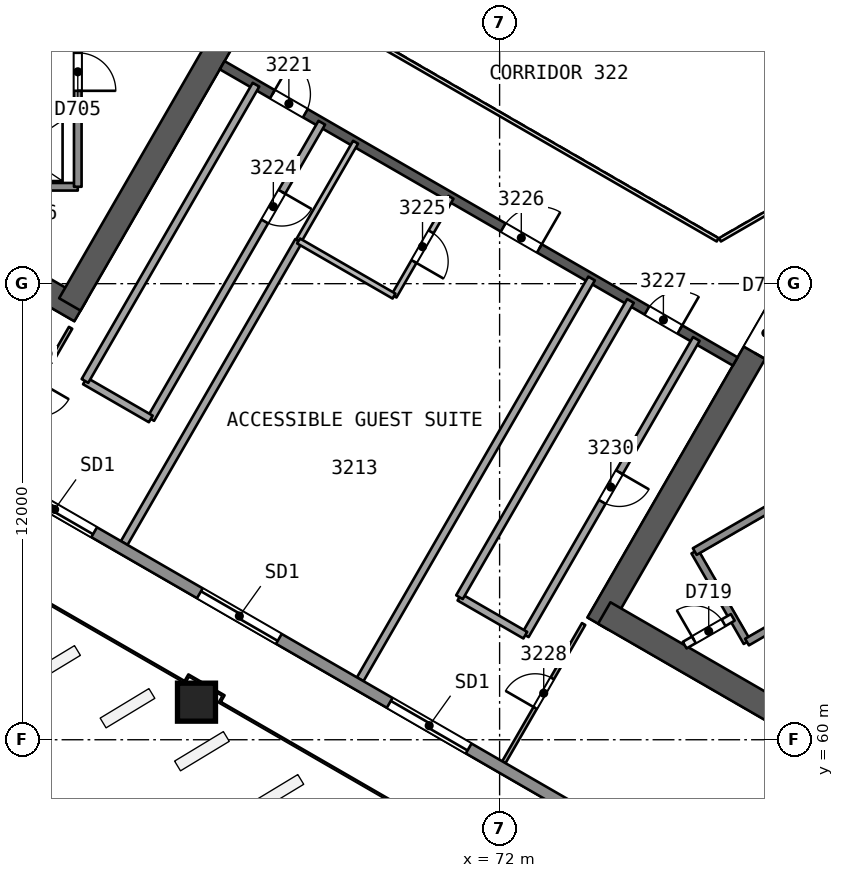
"""IFC4 building model, lengths in metres.
Left out: names, types, materials, properties, quantities, classifications, styles, units other than length and angle.
Written with IfcOpenShell. Run it as: python <this file> out.ifc"""

import sys

from ifc_helpers import new_model, si_unit, direction, frame, frame_2d, origin, origin_2d, place, context, subcontext, project, spatial, rectangle, extrude, element, fill, save


model = new_model("IFC4")
c1 = context("Model", 3, precision=1e-05, world=origin(), true_north=direction((0.0, 1.0)))
c2 = subcontext(c1, "Body", "Model", "MODEL_VIEW")
j1 = project(units=[si_unit("LENGTHUNIT", "METRE"), si_unit("PLANEANGLEUNIT", "RADIAN")], contexts=[c1])
p1 = place(None, origin())
s1 = spatial("IfcSite", under=j1, at=p1, CompositionType="ELEMENT")
p2 = place(p1, origin())
s2 = spatial("IfcBuilding", under=s1, at=p2, CompositionType="ELEMENT")
p3 = place(p2, frame((0.0, 0.0, 132.7)))
s3 = spatial("IfcBuildingStorey", under=s2, at=p3, CompositionType="ELEMENT", Elevation=132.7)
p4 = place(p3, frame((48.722, 78.365, 0.0), z_axis=(0.0, 0.0, 1.0), x_axis=(0.866020036431, -0.500009296414, 0.0)))
e1 = element("IfcWall", 1, at=p4, inside=s3, PredefinedType="SHEAR", context=c2, shape_type="SweptSolid", body=[
    extrude(rectangle(XDim=14.146, YDim=0.65, at=frame_2d((7.073, 0.0))), origin(), (0.0, 0.0, 1.0), 3.7),
])
p5 = place(p3, frame((60.691, 71.455, 0.0), z_axis=(0.0, 0.0, 1.0), x_axis=(0.499983075189, 0.866035175108, 0.0)))
e2 = element("IfcWall", 2, at=p5, inside=s3, PredefinedType="SHEAR", context=c2, shape_type="SweptSolid", body=[
    extrude(rectangle(XDim=10.055, YDim=0.65, at=frame_2d((5.027, 0.0))), origin(), (0.0, 0.0, 1.0), 3.7),
])
p6 = place(p5, frame((7.905, 0.0, 0.0)))
e3 = element("IfcOpeningElement", 3, at=p6, cuts=e2, PredefinedType="OPENING", context=c2, shape_type="SweptSolid", body=[
    extrude(rectangle(XDim=1.2, YDim=2.1, at=frame_2d((0.6, 1.05))), frame((0.0, 0.335, 0.0), z_axis=(0.0, -1.0, 0.0), x_axis=(1.0, 0.0, 0.0)), (0.0, 0.0, 1.0), 0.671),
])
p7 = place(p3, frame((79.688, 71.881, 0.0), z_axis=(0.0, 0.0, 1.0), x_axis=(-0.49999822179, -0.866026430432, 0.0)))
e4 = element("IfcWall", 4, at=p7, inside=s3, PredefinedType="SHEAR", context=c2, shape_type="SweptSolid", body=[
    extrude(rectangle(XDim=10.192, YDim=0.65, at=frame_2d((5.096, 0.0))), origin(), (0.0, 0.0, 1.0), 3.7),
])
p8 = place(p7, frame((0.762, 0.0, 0.0)))
e5 = element("IfcOpeningElement", 5, at=p8, cuts=e4, PredefinedType="OPENING", context=c2, shape_type="SweptSolid", body=[
    extrude(rectangle(XDim=1.2, YDim=2.1, at=frame_2d((0.6, 1.05))), frame((0.0, 0.335, 0.0), z_axis=(0.0, -1.0, 0.0), x_axis=(1.0, 0.0, 0.0)), (0.0, 0.0, 1.0), 0.671),
])
p9 = place(p3, frame((74.754, 63.335, 0.0), z_axis=(0.0, 0.0, 1.0), x_axis=(0.866026250715, -0.49999853307, 0.0)))
e6 = element("IfcWall", 6, at=p9, inside=s3, PredefinedType="SHEAR", context=c2, shape_type="SweptSolid", body=[
    extrude(rectangle(XDim=14.008, YDim=0.65, at=frame_2d((7.004, 0.0))), origin(), (0.0, 0.0, 1.0), 3.7),
])
p10 = place(p3, frame((64.7, 77.748, 0.0), z_axis=(0.0, 0.0, 1.0), x_axis=(0.866026492143, -0.499998114903, 0.0)))
e7 = element("IfcWall", 7, at=p10, inside=s3, PredefinedType="SHEAR", context=c2, shape_type="SweptSolid", body=[
    extrude(rectangle(XDim=15.588, YDim=0.25, at=frame_2d((7.794, 0.0))), origin(), (0.0, 0.0, 1.0), 3.25),
])
p11 = place(p10, frame((1.527, 0.0, 0.0)))
e8 = element("IfcOpeningElement", 8, at=p11, cuts=e7, PredefinedType="OPENING", context=c2, shape_type="SweptSolid", body=[
    extrude(rectangle(XDim=1.0, YDim=2.1, at=frame_2d((0.5, 1.05))), frame((0.0, 0.135, 0.0), z_axis=(0.0, -1.0, 0.0), x_axis=(1.0, 0.0, 0.0)), (0.0, 0.0, 1.0), 0.271),
])
p12 = place(p10, frame((8.538, 0.0, 0.0)))
e9 = element("IfcOpeningElement", 9, at=p12, cuts=e7, PredefinedType="OPENING", context=c2, shape_type="SweptSolid", body=[
    extrude(rectangle(XDim=1.1, YDim=2.1, at=frame_2d((0.55, 1.05))), frame((0.0, 0.135, 0.0), z_axis=(0.0, -1.0, 0.0), x_axis=(1.0, 0.0, 0.0)), (0.0, 0.0, 1.0), 0.271),
])
p13 = place(p10, frame((12.906, 0.0, 0.0)))
e10 = element("IfcOpeningElement", 10, at=p13, cuts=e7, PredefinedType="OPENING", context=c2, shape_type="SweptSolid", body=[
    extrude(rectangle(XDim=1.0, YDim=2.1, at=frame_2d((0.5, 1.05))), frame((0.0, 0.135, 0.0), z_axis=(0.0, -1.0, 0.0), x_axis=(1.0, 0.0, 0.0)), (0.0, 0.0, 1.0), 0.271),
])
p14 = place(p3, frame((64.012, 60.968, 0.0), z_axis=(0.010093620709, 0.017482414954, 0.999796221231), x_axis=(-0.499907122366, -0.865843723195, 0.020187025824)))
e11 = element("IfcColumn", 11, at=p14, inside=s3, PredefinedType="COLUMN", context=c2, shape_type="SweptSolid", body=[
    extrude(rectangle(XDim=1.0, YDim=1.0, at=origin_2d()), origin(), (0.0, 0.0, 1.0), 3.701),
])
p15 = place(p3, frame((60.71, 70.838, 0.0), z_axis=(0.0, 0.0, 1.0), x_axis=(-0.49999760543, -0.866026786286, 0.0)))
e12 = element("IfcWall", 12, at=p15, inside=s3, PredefinedType="PARTITIONING", context=c2, shape_type="SweptSolid", body=[
    extrude(rectangle(XDim=4.199, YDim=0.1, at=frame_2d((2.099, 0.0))), origin(), (0.0, 0.0, 1.0), 3.25),
])
p16 = place(p15, frame((1.649, 0.0, 0.0)))
e13 = element("IfcOpeningElement", 13, at=p16, cuts=e12, PredefinedType="OPENING", context=c2, shape_type="SweptSolid", body=[
    extrude(rectangle(XDim=0.9, YDim=2.1, at=frame_2d((0.45, 1.05))), frame((0.0, 0.061, 0.0), z_axis=(0.0, -1.0, 0.0), x_axis=(1.0, 0.0, 0.0)), (0.0, 0.0, 1.0), 0.121),
])
p17 = place(p3, frame((67.321, 76.235, 0.0), z_axis=(0.0, 0.0, 1.0), x_axis=(-0.5000018851, -0.866024315419, 0.0)))
e14 = element("IfcWall", 14, at=p17, inside=s3, PredefinedType="PARTITIONING", context=c2, shape_type="SweptSolid", body=[
    extrude(rectangle(XDim=9.0, YDim=0.2, at=frame_2d((4.5, 0.0))), origin(), (0.0, 0.0, 1.0), 3.25),
])
p18 = place(p17, frame((2.1, 0.0, 0.0)))
e15 = element("IfcOpeningElement", 15, at=p18, cuts=e14, PredefinedType="OPENING", context=c2, shape_type="SweptSolid", body=[
    extrude(rectangle(XDim=0.9, YDim=2.1, at=frame_2d((0.45, 1.05))), frame((0.0, 0.11, 0.0), z_axis=(0.0, -1.0, 0.0), x_axis=(1.0, 0.0, 0.0)), (0.0, 0.0, 1.0), 0.221),
])
p19 = place(p3, frame((62.821, 68.441, 0.0), z_axis=(0.0, 0.0, 1.0), x_axis=(-0.866041268327, 0.499972520799, 0.0)))
e16 = element("IfcWall", 16, at=p19, inside=s3, PredefinedType="PARTITIONING", context=c2, shape_type="SweptSolid", body=[
    extrude(rectangle(XDim=2.0, YDim=0.2, at=frame_2d((1.0, 0.0))), origin(), (0.0, 0.0, 1.0), 3.25),
])
p20 = place(p3, frame((61.089, 69.441, 0.0), z_axis=(0.0, 0.0, 1.0), x_axis=(0.5000018851, 0.866024315419, 0.0)))
e17 = element("IfcWall", 17, at=p20, inside=s3, PredefinedType="PARTITIONING", context=c2, shape_type="SweptSolid", body=[
    extrude(rectangle(XDim=9.0, YDim=0.2, at=frame_2d((4.5, 0.0))), origin(), (0.0, 0.0, 1.0), 3.25),
])
p21 = place(p3, frame((62.121, 65.176, 0.0), z_axis=(0.0, 0.0, 1.0), x_axis=(0.5000072221, 0.866021234063, 0.0)))
e18 = element("IfcWall", 18, at=p21, inside=s3, PredefinedType="PARTITIONING", context=c2, shape_type="SweptSolid", body=[
    extrude(rectangle(XDim=9.177, YDim=0.2, at=frame_2d((4.589, 0.0))), origin(), (0.0, 0.0, 1.0), 3.25),
])
p22 = place(p3, frame((66.71, 73.124, 0.0), z_axis=(0.0, 0.0, 1.0), x_axis=(0.499990139034, 0.866031096941, 0.0)))
e19 = element("IfcWall", 19, at=p22, inside=s3, PredefinedType="PARTITIONING", context=c2, shape_type="SweptSolid", body=[
    extrude(rectangle(XDim=3.0, YDim=0.15, at=frame_2d((1.5, 0.0))), origin(), (0.0, 0.0, 1.0), 3.25),
])
p23 = place(p3, frame((70.721, 74.272, 0.0), z_axis=(0.0, 0.0, 1.0), x_axis=(-0.50002537861, -0.866010750942, 0.0)))
e20 = element("IfcWall", 20, at=p23, inside=s3, PredefinedType="PARTITIONING", context=c2, shape_type="SweptSolid", body=[
    extrude(rectangle(XDim=3.0, YDim=0.15, at=frame_2d((1.5, 0.0))), origin(), (0.0, 0.0, 1.0), 3.25),
])
p24 = place(p23, frame((1.05, 0.0, 0.0)))
e21 = element("IfcOpeningElement", 21, at=p24, cuts=e20, PredefinedType="OPENING", context=c2, shape_type="SweptSolid", body=[
    extrude(rectangle(XDim=0.9, YDim=2.1, at=frame_2d((0.45, 1.05))), frame((0.0, 0.085, 0.0), z_axis=(0.0, -1.0, 0.0), x_axis=(1.0, 0.0, 0.0)), (0.0, 0.0, 1.0), 0.171),
])
p25 = place(p3, frame((69.221, 71.674, 0.0), z_axis=(0.0, 0.0, 1.0), x_axis=(-0.866032775405, 0.499987231761, 0.0)))
e22 = element("IfcWall", 22, at=p25, inside=s3, PredefinedType="PARTITIONING", context=c2, shape_type="SweptSolid", body=[
    extrude(rectangle(XDim=2.9, YDim=0.15, at=frame_2d((1.45, 0.0))), origin(), (0.0, 0.0, 1.0), 3.25),
])
p26 = place(p3, frame((68.331, 61.59, 0.0), z_axis=(0.0, 0.0, 1.0), x_axis=(0.499987977232, 0.866032345022, 0.0)))
e23 = element("IfcWall", 23, at=p26, inside=s3, PredefinedType="PARTITIONING", context=c2, shape_type="SweptSolid", body=[
    extrude(rectangle(XDim=12.177, YDim=0.2, at=frame_2d((6.089, 0.0))), origin(), (0.0, 0.0, 1.0), 3.25),
])
p27 = place(p3, frame((72.111, 59.408, 0.0), z_axis=(0.0, 0.0, 1.0), x_axis=(0.49999760543, 0.866026786286, 0.0)))
e24 = element("IfcWall", 24, at=p27, inside=s3, PredefinedType="PARTITIONING", context=c2, shape_type="SweptSolid", body=[
    extrude(rectangle(XDim=4.199, YDim=0.1, at=frame_2d((2.099, 0.0))), origin(), (0.0, 0.0, 1.0), 3.25),
])
p28 = place(p27, frame((1.649, 0.0, 0.0)))
e25 = element("IfcOpeningElement", 25, at=p28, cuts=e24, PredefinedType="OPENING", context=c2, shape_type="SweptSolid", body=[
    extrude(rectangle(XDim=0.9, YDim=2.1, at=frame_2d((0.45, 1.05))), frame((0.0, 0.061, 0.0), z_axis=(0.0, -1.0, 0.0), x_axis=(1.0, 0.0, 0.0)), (0.0, 0.0, 1.0), 0.121),
])
p29 = place(p3, frame((77.176, 70.545, 0.0), z_axis=(0.0, 0.0, 1.0), x_axis=(-0.499990139034, -0.866031096941, 0.0)))
e26 = element("IfcWall", 26, at=p29, inside=s3, PredefinedType="PARTITIONING", context=c2, shape_type="SweptSolid", body=[
    extrude(rectangle(XDim=9.0, YDim=0.2, at=frame_2d((4.5, 0.0))), origin(), (0.0, 0.0, 1.0), 3.25),
])
p30 = place(p29, frame((4.05, 0.0, 0.0)))
e27 = element("IfcOpeningElement", 27, at=p30, cuts=e26, PredefinedType="OPENING", context=c2, shape_type="SweptSolid", body=[
    extrude(rectangle(XDim=0.9, YDim=2.1, at=frame_2d((0.45, 1.05))), frame((0.0, 0.11, 0.0), z_axis=(0.0, -1.0, 0.0), x_axis=(1.0, 0.0, 0.0)), (0.0, 0.0, 1.0), 0.221),
])
p31 = place(p3, frame((72.676, 62.751, 0.0), z_axis=(0.0, 0.0, 1.0), x_axis=(-0.866010750942, 0.50002537861, 0.0)))
e28 = element("IfcWall", 28, at=p31, inside=s3, PredefinedType="PARTITIONING", context=c2, shape_type="SweptSolid", body=[
    extrude(rectangle(XDim=2.0, YDim=0.2, at=frame_2d((1.0, 0.0))), origin(), (0.0, 0.0, 1.0), 3.25),
])
p32 = place(p3, frame((70.944, 63.751, 0.0), z_axis=(0.0, 0.0, 1.0), x_axis=(0.499990139034, 0.866031096941, 0.0)))
e29 = element("IfcWall", 29, at=p32, inside=s3, PredefinedType="PARTITIONING", context=c2, shape_type="SweptSolid", body=[
    extrude(rectangle(XDim=9.0, YDim=0.2, at=frame_2d((4.5, 0.0))), origin(), (0.0, 0.0, 1.0), 3.25),
])
p33 = place(p3, frame((89.477, 49.21, 0.0), z_axis=(0.0, 0.0, 1.0), x_axis=(-0.866026276916, 0.499998487688, 0.0)))
e30 = element("IfcWall", 30, at=p33, inside=s3, PredefinedType="SOLIDWALL", context=c2, shape_type="SweptSolid", body=[
    extrude(rectangle(XDim=55.864, YDim=0.3, at=frame_2d((27.932, 0.0))), origin(), (0.0, 0.0, 1.0), 3.25),
])
p34 = place(p33, frame((26.888, 0.0, 0.0)))
e31 = element("IfcOpeningElement", 31, at=p34, cuts=e30, PredefinedType="OPENING", context=c2, shape_type="SweptSolid", body=[
    extrude(rectangle(XDim=2.4, YDim=2.4, at=frame_2d((1.2, 1.2))), frame((0.0, 0.161, 0.0), z_axis=(0.0, -1.0, 0.0), x_axis=(1.0, 0.0, 0.0)), (0.0, 0.0, 1.0), 0.321),
])
p35 = place(p33, frame((32.5, 0.0, 0.0)))
e32 = element("IfcOpeningElement", 32, at=p35, cuts=e30, PredefinedType="OPENING", context=c2, shape_type="SweptSolid", body=[
    extrude(rectangle(XDim=2.4, YDim=2.4, at=frame_2d((1.2, 1.2))), frame((0.0, 0.161, 0.0), z_axis=(0.0, -1.0, 0.0), x_axis=(1.0, 0.0, 0.0)), (0.0, 0.0, 1.0), 0.321),
])
p36 = place(p33, frame((43.384, 0.0, 0.0)))
e33 = element("IfcOpeningElement", 33, at=p36, cuts=e30, PredefinedType="OPENING", context=c2, shape_type="SweptSolid", body=[
    extrude(rectangle(XDim=2.4, YDim=2.4, at=frame_2d((1.2, 1.2))), frame((0.0, 0.161, 0.0), z_axis=(0.0, -1.0, 0.0), x_axis=(1.0, 0.0, 0.0)), (0.0, 0.0, 1.0), 0.321),
])
p37 = place(p33, frame((21.12, 0.0, 0.0)))
e34 = element("IfcOpeningElement", 34, at=p37, cuts=e30, PredefinedType="OPENING", context=c2, shape_type="SweptSolid", body=[
    extrude(rectangle(XDim=2.4, YDim=2.4, at=frame_2d((1.2, 1.2))), frame((0.0, 0.161, 0.0), z_axis=(0.0, -1.0, 0.0), x_axis=(1.0, 0.0, 0.0)), (0.0, 0.0, 1.0), 0.321),
])
p38 = place(p33, frame((10.029, 0.0, 0.0)))
e35 = element("IfcOpeningElement", 35, at=p38, cuts=e30, PredefinedType="OPENING", context=c2, shape_type="SweptSolid", body=[
    extrude(rectangle(XDim=2.4, YDim=2.4, at=frame_2d((1.2, 1.2))), frame((0.0, 0.161, 0.0), z_axis=(0.0, -1.0, 0.0), x_axis=(1.0, 0.0, 0.0)), (0.0, 0.0, 1.0), 0.321),
])
for number, where, z_axis, x_axis in (
    (36, (60.9, 76.45, 0.0), (0.0, 0.0, 1.0), (-1.0, 0.0, 0.0)),
    (37, (60.9, 74.55, 0.0), (0.0, 0.0, 1.0), (-1.0, 0.0, 0.0)),
):
    element("IfcWall", number, at=place(p3, frame(where, z_axis=z_axis, x_axis=x_axis)), inside=s3, PredefinedType="SOLIDWALL", context=c2, shape_type="SweptSolid", body=[
        extrude(rectangle(XDim=3.05, YDim=0.2, at=frame_2d((1.525, 0.0))), origin(), (0.0, 0.0, 1.0), 3.25),
    ])
p39 = place(p3, frame((60.9, 85.45, 0.0), z_axis=(0.0, 0.0, 1.0), x_axis=(0.0, -1.0, 0.0)))
e38 = element("IfcWall", 38, at=p39, inside=s3, PredefinedType="SOLIDWALL", context=c2, shape_type="SweptSolid", body=[
    extrude(rectangle(XDim=10.9, YDim=0.2, at=frame_2d((5.45, 0.0))), origin(), (0.0, 0.0, 1.0), 3.25),
])
p40 = place(p39, frame((1.75, 0.0, 0.0)))
e39 = element("IfcOpeningElement", 39, at=p40, cuts=e38, PredefinedType="OPENING", context=c2, shape_type="SweptSolid", body=[
    extrude(rectangle(XDim=1.0, YDim=2.1, at=frame_2d((0.5, 1.05))), frame((0.0, 0.11, 0.0), z_axis=(0.0, -1.0, 0.0), x_axis=(1.0, 0.0, 0.0)), (0.0, 0.0, 1.0), 0.221),
])
p41 = place(p39, frame((5.125, 0.0, 0.0)))
e40 = element("IfcOpeningElement", 40, at=p41, cuts=e38, PredefinedType="OPENING", context=c2, shape_type="SweptSolid", body=[
    extrude(rectangle(XDim=1.0, YDim=2.1, at=frame_2d((0.5, 1.05))), frame((0.0, 0.11, 0.0), z_axis=(0.0, -1.0, 0.0), x_axis=(1.0, 0.0, 0.0)), (0.0, 0.0, 1.0), 0.221),
])
p42 = place(p39, frame((7.375, 0.0, 0.0)))
e41 = element("IfcOpeningElement", 41, at=p42, cuts=e38, PredefinedType="OPENING", context=c2, shape_type="SweptSolid", body=[
    extrude(rectangle(XDim=1.0, YDim=2.1, at=frame_2d((0.5, 1.05))), frame((0.0, 0.11, 0.0), z_axis=(0.0, -1.0, 0.0), x_axis=(1.0, 0.0, 0.0)), (0.0, 0.0, 1.0), 0.221),
])
p43 = place(p3, frame((77.135, 64.952, 0.0), z_axis=(0.0, 0.0, 1.0), x_axis=(0.499996545922, -0.866027397988, 0.0)))
e42 = element("IfcWall", 42, at=p43, inside=s3, PredefinedType="SOLIDWALL", context=c2, shape_type="SweptSolid", body=[
    extrude(rectangle(XDim=2.75, YDim=0.2, at=frame_2d((1.375, 0.0))), origin(), (0.0, 0.0, 1.0), 3.25),
])
p44 = place(p3, frame((77.135, 64.952, 0.0), z_axis=(0.0, 0.0, 1.0), x_axis=(0.866031916153, 0.499988720078, 0.0)))
e43 = element("IfcWall", 43, at=p44, inside=s3, PredefinedType="SOLIDWALL", context=c2, shape_type="SweptSolid", body=[
    extrude(rectangle(XDim=11.35, YDim=0.2, at=frame_2d((5.675, 0.0))), origin(), (0.0, 0.0, 1.0), 3.25),
])
p45 = place(p3, frame((76.87, 62.489, 0.0), z_axis=(0.0, 0.0, 1.0), x_axis=(0.866054810376, 0.49994906283, 0.0)))
e44 = element("IfcWall", 44, at=p45, inside=s3, PredefinedType="PARTITIONING", context=c2, shape_type="SweptSolid", body=[
    extrude(rectangle(XDim=1.461, YDim=0.2, at=frame_2d((0.73, 0.0))), origin(), (0.0, 0.0, 1.0), 3.25),
])
p46 = place(p45, frame((0.281, 0.0, 0.0)))
e45 = element("IfcOpeningElement", 45, at=p46, cuts=e44, PredefinedType="OPENING", context=c2, shape_type="SweptSolid", body=[
    extrude(rectangle(XDim=0.9, YDim=2.1, at=frame_2d((0.45, 1.05))), frame((0.0, 0.11, 0.0), z_axis=(0.0, -1.0, 0.0), x_axis=(1.0, 0.0, 0.0)), (0.0, 0.0, 1.0), 0.221),
])
p47 = place(p3, frame((78.51, 62.57, 0.0), z_axis=(0.0, 0.0, 1.0), x_axis=(0.866053019151, 0.499952165731, 0.0)))
e46 = element("IfcWall", 46, at=p47, inside=s3, PredefinedType="SOLIDWALL", context=c2, shape_type="SweptSolid", body=[
    extrude(rectangle(XDim=2.3, YDim=0.2, at=frame_2d((1.15, 0.0))), origin(), (0.0, 0.0, 1.0), 3.25),
])
p48 = place(p3, frame((67.702, 78.948, 0.0), z_axis=(0.0, 0.0, 1.0), x_axis=(0.866026658274, -0.499997827154, 0.0)))
e47 = element("IfcWall", 47, at=p48, inside=s3, PredefinedType="PARTITIONING", context=c2, shape_type="SweptSolid", body=[
    extrude(rectangle(XDim=11.588, YDim=0.1, at=frame_2d((5.794, 0.0))), origin(), (0.0, 0.0, 1.0), 3.25),
])
p49 = place(p3, frame((77.798, 73.154, 0.0), z_axis=(0.0, 0.0, 1.0), x_axis=(0.866041268327, 0.499972520799, 0.0)))
e48 = element("IfcWall", 48, at=p49, inside=s3, PredefinedType="PARTITIONING", context=c2, shape_type="SweptSolid", body=[
    extrude(rectangle(XDim=2.0, YDim=0.1, at=frame_2d((1.0, 0.0))), origin(), (0.0, 0.0, 1.0), 3.25),
])
p50 = place(p11, origin())
e49 = element("IfcDoor", 49, at=p50, inside=s3, OperationType="SINGLE_SWING_LEFT", PredefinedType="NOTDEFINED", context=c2, shape_type="SweptSolid", body=[
    extrude(rectangle(XDim=1.0, YDim=2.1, at=frame_2d((0.5, 1.05))), frame((0.0, 0.025, 0.0), z_axis=(0.0, -1.0, 0.0), x_axis=(1.0, 0.0, 0.0)), (0.0, 0.0, 1.0), 0.05),
])
fill(e8, e49)
p51 = place(p18, origin())
e50 = element("IfcDoor", 50, at=p51, inside=s3, OperationType="SINGLE_SWING_LEFT", PredefinedType="NOTDEFINED", context=c2, shape_type="SweptSolid", body=[
    extrude(rectangle(XDim=0.9, YDim=2.1, at=frame_2d((0.45, 1.05))), frame((0.0, 0.025, 0.0), z_axis=(0.0, -1.0, 0.0), x_axis=(1.0, 0.0, 0.0)), (0.0, 0.0, 1.0), 0.05),
])
fill(e15, e50)
p52 = place(p24, origin())
e51 = element("IfcDoor", 51, at=p52, inside=s3, OperationType="SINGLE_SWING_RIGHT", PredefinedType="NOTDEFINED", context=c2, shape_type="SweptSolid", body=[
    extrude(rectangle(XDim=0.9, YDim=2.1, at=frame_2d((0.45, 1.05))), frame((0.0, 0.025, 0.0), z_axis=(0.0, -1.0, 0.0), x_axis=(1.0, 0.0, 0.0)), (0.0, 0.0, 1.0), 0.05),
])
fill(e21, e51)
p53 = place(p12, origin())
e52 = element("IfcDoor", 52, at=p53, inside=s3, OperationType="SINGLE_SWING_RIGHT", PredefinedType="NOTDEFINED", context=c2, shape_type="SweptSolid", body=[
    extrude(rectangle(XDim=1.1, YDim=2.1, at=frame_2d((0.55, 1.05))), frame((0.0, 0.025, 0.0), z_axis=(0.0, -1.0, 0.0), x_axis=(1.0, 0.0, 0.0)), (0.0, 0.0, 1.0), 0.05),
])
fill(e9, e52)
p54 = place(p13, origin())
e53 = element("IfcDoor", 53, at=p54, inside=s3, OperationType="SINGLE_SWING_RIGHT", PredefinedType="NOTDEFINED", context=c2, shape_type="SweptSolid", body=[
    extrude(rectangle(XDim=1.0, YDim=2.1, at=frame_2d((0.5, 1.05))), frame((0.0, 0.025, 0.0), z_axis=(0.0, -1.0, 0.0), x_axis=(1.0, 0.0, 0.0)), (0.0, 0.0, 1.0), 0.05),
])
fill(e10, e53)
p55 = place(p28, origin())
e54 = element("IfcDoor", 54, at=p55, inside=s3, OperationType="SINGLE_SWING_LEFT", PredefinedType="NOTDEFINED", context=c2, shape_type="SweptSolid", body=[
    extrude(rectangle(XDim=0.9, YDim=2.1, at=frame_2d((0.45, 1.05))), frame((0.0, 0.025, 0.0), z_axis=(0.0, -1.0, 0.0), x_axis=(1.0, 0.0, 0.0)), (0.0, 0.0, 1.0), 0.05),
])
fill(e25, e54)
p56 = place(p30, origin())
e55 = element("IfcDoor", 55, at=p56, inside=s3, OperationType="SINGLE_SWING_LEFT", PredefinedType="NOTDEFINED", context=c2, shape_type="SweptSolid", body=[
    extrude(rectangle(XDim=0.9, YDim=2.1, at=frame_2d((0.45, 1.05))), frame((0.0, 0.025, 0.0), z_axis=(0.0, -1.0, 0.0), x_axis=(1.0, 0.0, 0.0)), (0.0, 0.0, 1.0), 0.05),
])
fill(e27, e55)
p57 = place(p34, origin())
e56 = element("IfcDoor", 56, at=p57, inside=s3, OperationType="SLIDING_TO_LEFT", PredefinedType="NOTDEFINED", context=c2, shape_type="SweptSolid", body=[
    extrude(rectangle(XDim=2.4, YDim=2.4, at=frame_2d((1.2, 1.2))), frame((0.0, 0.025, 0.0), z_axis=(0.0, -1.0, 0.0), x_axis=(1.0, 0.0, 0.0)), (0.0, 0.0, 1.0), 0.05),
])
fill(e31, e56)
p58 = place(p35, origin())
e57 = element("IfcDoor", 57, at=p58, inside=s3, OperationType="SLIDING_TO_RIGHT", PredefinedType="NOTDEFINED", context=c2, shape_type="SweptSolid", body=[
    extrude(rectangle(XDim=2.4, YDim=2.4, at=frame_2d((1.2, 1.2))), frame((0.0, 0.025, 0.0), z_axis=(0.0, -1.0, 0.0), x_axis=(1.0, 0.0, 0.0)), (0.0, 0.0, 1.0), 0.05),
])
fill(e32, e57)
p59 = place(p37, origin())
e58 = element("IfcDoor", 58, at=p59, inside=s3, OperationType="SLIDING_TO_RIGHT", PredefinedType="NOTDEFINED", context=c2, shape_type="SweptSolid", body=[
    extrude(rectangle(XDim=2.4, YDim=2.4, at=frame_2d((1.2, 1.2))), frame((0.0, 0.025, 0.0), z_axis=(0.0, -1.0, 0.0), x_axis=(1.0, 0.0, 0.0)), (0.0, 0.0, 1.0), 0.05),
])
fill(e34, e58)
p60 = place(p42, origin())
e59 = element("IfcDoor", 59, at=p60, inside=s3, OperationType="SINGLE_SWING_RIGHT", PredefinedType="NOTDEFINED", context=c2, shape_type="SweptSolid", body=[
    extrude(rectangle(XDim=1.0, YDim=2.1, at=frame_2d((0.5, 1.05))), frame((0.0, 0.025, 0.0), z_axis=(0.0, -1.0, 0.0), x_axis=(1.0, 0.0, 0.0)), (0.0, 0.0, 1.0), 0.05),
])
fill(e41, e59)
p61 = place(p8, origin())
e60 = element("IfcDoor", 60, at=p61, inside=s3, OperationType="SINGLE_SWING_RIGHT", PredefinedType="NOTDEFINED", context=c2, shape_type="SweptSolid", body=[
    extrude(rectangle(XDim=1.2, YDim=2.1, at=frame_2d((0.6, 1.05))), frame((0.0, 0.025, 0.0), z_axis=(0.0, -1.0, 0.0), x_axis=(1.0, 0.0, 0.0)), (0.0, 0.0, 1.0), 0.05),
])
fill(e5, e60)
p62 = place(p46, origin())
e61 = element("IfcDoor", 61, at=p62, inside=s3, OperationType="SINGLE_SWING_LEFT", PredefinedType="NOTDEFINED", context=c2, shape_type="SweptSolid", body=[
    extrude(rectangle(XDim=0.9, YDim=2.1, at=frame_2d((0.45, 1.05))), frame((0.0, 0.025, 0.0), z_axis=(0.0, -1.0, 0.0), x_axis=(1.0, 0.0, 0.0)), (0.0, 0.0, 1.0), 0.05),
])
fill(e45, e61)
save(model, sys.argv[1])
